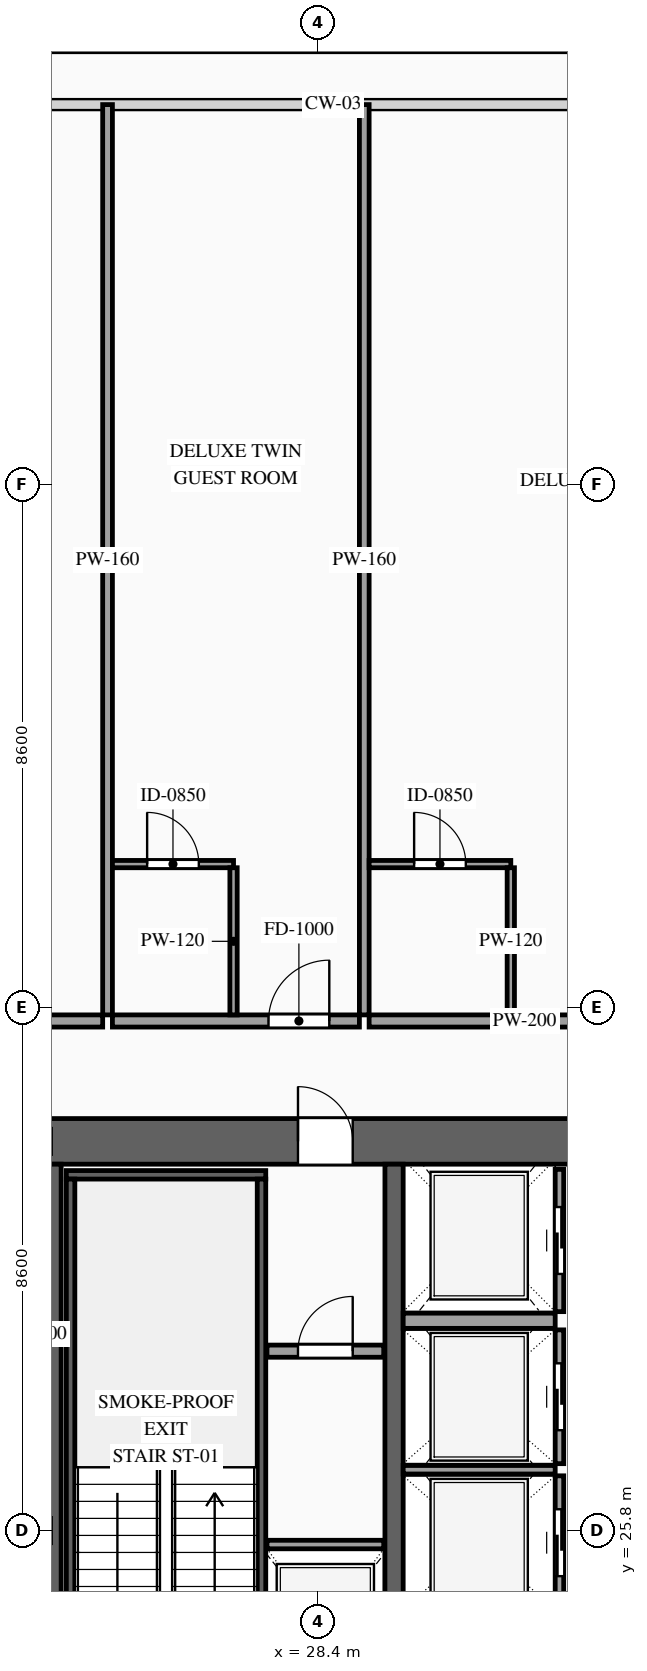
"""IFC4 building model, lengths in metres.
Left out: names, types, materials, properties, quantities, classifications, styles, units other than length and angle.
Written with IfcOpenShell. Run it as: python <this file> out.ifc"""

import sys

from ifc_helpers import new_model, si_unit, direction, frame, frame_2d, origin, place, context, subcontext, project, spatial, rectangle, extrude, source, transform, mapped, element, fill, save


model = new_model("IFC4")
c1 = context("Model", 3, precision=1e-05, world=origin(), true_north=direction((0.0, 1.0)))
c2 = subcontext(c1, "Body", "Model", "MODEL_VIEW")
j1 = project(units=[si_unit("LENGTHUNIT", "METRE"), si_unit("PLANEANGLEUNIT", "RADIAN")], contexts=[c1])
p1 = place(None, origin())
s1 = spatial("IfcSite", under=j1, at=p1, CompositionType="ELEMENT")
p2 = place(p1, origin())
s2 = spatial("IfcBuilding", under=s1, at=p2, CompositionType="ELEMENT")
p3 = place(p2, frame((0.0, 0.0, 145.2)))
s3 = spatial("IfcBuildingStorey", under=s2, at=p3, CompositionType="ELEMENT", Elevation=145.2)
p4 = place(p3, frame((23.425, 32.2, 0.0), z_axis=(0.0, 0.0, 1.0), x_axis=(1.0, 0.0, 0.0)))
e1 = element("IfcWall", 1, at=p4, inside=s3, PredefinedType="SHEAR", context=c2, shape_type="SweptSolid", body=[
    extrude(rectangle(XDim=27.15, YDim=0.75, at=frame_2d((13.575, 0.0))), origin(), (0.0, 0.0, 1.0), 3.6),
])
p5 = place(p4, frame((4.645, 0.0, 0.0)))
e2 = element("IfcOpeningElement", 2, at=p5, cuts=e1, PredefinedType="OPENING", context=c2, shape_type="SweptSolid", body=[
    extrude(rectangle(XDim=0.9, YDim=2.15, at=frame_2d((0.45, 1.075))), frame((0.0, 0.39, 0.0), z_axis=(0.0, -1.0, 0.0), x_axis=(1.0, 0.0, 0.0)), (0.0, 0.0, 1.0), 0.78),
])
p6 = place(p4, frame((9.925, 0.0, 0.0)))
e3 = element("IfcOpeningElement", 3, at=p6, cuts=e1, PredefinedType="OPENING", context=c2, shape_type="SweptSolid", body=[
    extrude(rectangle(XDim=1.1, YDim=2.2, at=frame_2d((0.55, 1.1))), frame((0.0, 0.39, 0.0), z_axis=(0.0, -1.0, 0.0), x_axis=(1.0, 0.0, 0.0)), (0.0, 0.0, 1.0), 0.78),
])
p7 = place(p4, frame((15.775, 0.0, 0.0)))
e4 = element("IfcOpeningElement", 4, at=p7, cuts=e1, PredefinedType="OPENING", context=c2, shape_type="SweptSolid", body=[
    extrude(rectangle(XDim=1.1, YDim=2.2, at=frame_2d((0.55, 1.1))), frame((0.0, 0.39, 0.0), z_axis=(0.0, -1.0, 0.0), x_axis=(1.0, 0.0, 0.0)), (0.0, 0.0, 1.0), 0.78),
])
p8 = place(p4, frame((19.745, 0.0, 0.0)))
e5 = element("IfcOpeningElement", 5, at=p8, cuts=e1, PredefinedType="OPENING", context=c2, shape_type="SweptSolid", body=[
    extrude(rectangle(XDim=0.9, YDim=2.15, at=frame_2d((0.45, 1.075))), frame((0.0, 0.39, 0.0), z_axis=(0.0, -1.0, 0.0), x_axis=(1.0, 0.0, 0.0)), (0.0, 0.0, 1.0), 0.78),
])
m1 = source(origin(), c2, "Body", "SweptSolid", [
    extrude(rectangle(XDim=12.05, YDim=0.75, at=frame_2d((6.025, 0.0))), origin(), (0.0, 0.0, 1.0), 3.6),
])
p9 = place(p3, frame((23.8, 19.775, 0.0), z_axis=(0.0, 0.0, 1.0), x_axis=(0.0, 1.0, 0.0)))
e6 = element("IfcWall", 6, at=p9, inside=s3, PredefinedType="SHEAR", context=c2, shape_type="MappedRepresentation", body=[
    mapped(m1, transform((0.0, 0.0, 0.0), scale=1.0)),
])
m2 = source(origin(), c2, "Body", "SweptSolid", [
    extrude(rectangle(XDim=12.05, YDim=0.3, at=frame_2d((6.025, 0.0))), origin(), (0.0, 0.0, 1.0), 3.6),
])
p10 = place(p3, frame((29.65, 19.775, 0.0), z_axis=(0.0, 0.0, 1.0), x_axis=(0.0, 1.0, 0.0)))
e7 = element("IfcWall", 7, at=p10, inside=s3, PredefinedType="SOLIDWALL", context=c2, shape_type="MappedRepresentation", body=[
    mapped(m2, transform((0.0, 0.0, 0.0), scale=1.0)),
])
m3 = source(origin(), c2, "Body", "SweptSolid", [
    extrude(rectangle(XDim=1.92, YDim=0.14, at=frame_2d((0.96, 0.0))), origin(), (0.0, 0.0, 1.0), 3.38),
])
p11 = place(p3, frame((27.56, 25.57, 0.0), z_axis=(0.0, 0.0, 1.0), x_axis=(1.0, 0.0, 0.0)))
e8 = element("IfcWall", 8, at=p11, inside=s3, PredefinedType="SOLIDWALL", context=c2, shape_type="MappedRepresentation", body=[
    mapped(m3, transform((0.0, 0.0, 0.0), scale=1.0)),
])
p12 = place(p3, frame((32.37, 24.5, 0.0), z_axis=(0.0, 0.0, 1.0), x_axis=(0.0, 1.0, 0.0)))
e9 = element("IfcWall", 9, at=p12, inside=s3, PredefinedType="SOLIDWALL", context=c2, shape_type="SweptSolid", body=[
    extrude(rectangle(XDim=2.2, YDim=0.14, at=frame_2d((1.1, 0.0))), origin(), (0.0, 0.0, 1.0), 3.38),
])
p13 = place(p12, frame((0.55, 0.0, 0.0)))
e10 = element("IfcOpeningElement", 10, at=p13, cuts=e9, PredefinedType="OPENING", context=c2, shape_type="SweptSolid", body=[
    extrude(rectangle(XDim=1.1, YDim=2.2, at=frame_2d((0.55, 1.1))), frame((0.0, 0.085, 0.0), z_axis=(0.0, -1.0, 0.0), x_axis=(1.0, 0.0, 0.0)), (0.0, 0.0, 1.0), 0.17),
])
m4 = source(origin(), c2, "Body", "SweptSolid", [
    extrude(rectangle(XDim=2.5, YDim=0.14, at=frame_2d((1.25, 0.0))), origin(), (0.0, 0.0, 1.0), 3.38),
])
p14 = place(p3, frame((29.8, 26.8, 0.0), z_axis=(0.0, 0.0, 1.0), x_axis=(1.0, 0.0, 0.0)))
e11 = element("IfcWall", 11, at=p14, inside=s3, PredefinedType="SOLIDWALL", context=c2, shape_type="MappedRepresentation", body=[
    mapped(m4, transform((0.0, 0.0, 0.0), scale=1.0)),
])
p15 = place(p3, frame((32.37, 26.9, 0.0), z_axis=(0.0, 0.0, 1.0), x_axis=(0.0, 1.0, 0.0)))
e12 = element("IfcWall", 12, at=p15, inside=s3, PredefinedType="SOLIDWALL", context=c2, shape_type="SweptSolid", body=[
    extrude(rectangle(XDim=2.2, YDim=0.14, at=frame_2d((1.1, 0.0))), origin(), (0.0, 0.0, 1.0), 3.38),
])
p16 = place(p15, frame((0.55, 0.0, 0.0)))
e13 = element("IfcOpeningElement", 13, at=p16, cuts=e12, PredefinedType="OPENING", context=c2, shape_type="SweptSolid", body=[
    extrude(rectangle(XDim=1.1, YDim=2.2, at=frame_2d((0.55, 1.1))), frame((0.0, 0.085, 0.0), z_axis=(0.0, -1.0, 0.0), x_axis=(1.0, 0.0, 0.0)), (0.0, 0.0, 1.0), 0.17),
])
p17 = place(p3, frame((32.37, 29.4, 0.0), z_axis=(0.0, 0.0, 1.0), x_axis=(0.0, 1.0, 0.0)))
e14 = element("IfcWall", 14, at=p17, inside=s3, PredefinedType="SOLIDWALL", context=c2, shape_type="SweptSolid", body=[
    extrude(rectangle(XDim=2.34, YDim=0.14, at=frame_2d((1.17, 0.0))), origin(), (0.0, 0.0, 1.0), 3.38),
])
p18 = place(p17, frame((0.62, 0.0, 0.0)))
e15 = element("IfcOpeningElement", 15, at=p18, cuts=e14, PredefinedType="OPENING", context=c2, shape_type="SweptSolid", body=[
    extrude(rectangle(XDim=1.1, YDim=2.2, at=frame_2d((0.55, 1.1))), frame((0.0, 0.085, 0.0), z_axis=(0.0, -1.0, 0.0), x_axis=(1.0, 0.0, 0.0)), (0.0, 0.0, 1.0), 0.17),
])
m5 = source(origin(), c2, "Body", "SweptSolid", [
    extrude(rectangle(XDim=2.5, YDim=0.25, at=frame_2d((1.25, 0.0))), origin(), (0.0, 0.0, 1.0), 3.38),
])
p19 = place(p3, frame((29.8, 29.25, 0.0), z_axis=(0.0, 0.0, 1.0), x_axis=(1.0, 0.0, 0.0)))
e16 = element("IfcWall", 16, at=p19, inside=s3, PredefinedType="SOLIDWALL", context=c2, shape_type="MappedRepresentation", body=[
    mapped(m5, transform((0.0, 0.0, 0.0), scale=1.0)),
])
m6 = source(origin(), c2, "Body", "SweptSolid", [
    extrude(rectangle(XDim=3.28, YDim=0.14, at=frame_2d((1.64, 0.0))), origin(), (0.0, 0.0, 1.0), 3.38),
])
p20 = place(p3, frame((24.26, 31.65, 0.0), z_axis=(0.0, 0.0, 1.0), x_axis=(1.0, 0.0, 0.0)))
e17 = element("IfcWall", 17, at=p20, inside=s3, PredefinedType="SOLIDWALL", context=c2, shape_type="MappedRepresentation", body=[
    mapped(m6, transform((0.0, 0.0, 0.0), scale=1.0)),
])
m7 = source(origin(), c2, "Body", "SweptSolid", [
    extrude(rectangle(XDim=8.94, YDim=0.14, at=frame_2d((4.47, 0.0))), origin(), (0.0, 0.0, 1.0), 3.38),
])
for number, where, z_axis, x_axis in (
    (18, (24.33, 22.64, 0.0), (0.0, 0.0, 1.0), (0.0, 1.0, 0.0)),
    (19, (27.47, 22.64, 0.0), (0.0, 0.0, 1.0), (0.0, 1.0, 0.0)),
):
    element("IfcWall", number, at=place(p3, frame(where, z_axis=z_axis, x_axis=x_axis)), inside=s3, PredefinedType="SOLIDWALL", context=c2, shape_type="MappedRepresentation", body=[
        mapped(m7, transform((0.0, 0.0, 0.0), scale=1.0)),
    ])
p21 = place(p3, frame((27.56, 28.75, 0.0), z_axis=(0.0, 0.0, 1.0), x_axis=(1.0, 0.0, 0.0)))
e20 = element("IfcWall", 20, at=p21, inside=s3, PredefinedType="PARTITIONING", context=c2, shape_type="SweptSolid", body=[
    extrude(rectangle(XDim=1.92, YDim=0.2, at=frame_2d((0.96, 0.0))), origin(), (0.0, 0.0, 1.0), 3.38),
])
p22 = place(p21, frame((0.51, 0.0, 0.0)))
e21 = element("IfcOpeningElement", 21, at=p22, cuts=e20, PredefinedType="OPENING", context=c2, shape_type="SweptSolid", body=[
    extrude(rectangle(XDim=0.9, YDim=2.15, at=frame_2d((0.45, 1.075))), frame((0.0, 0.115, 0.0), z_axis=(0.0, -1.0, 0.0), x_axis=(1.0, 0.0, 0.0)), (0.0, 0.0, 1.0), 0.23),
])
p23 = place(p3, frame((16.44, 34.18, 0.0), z_axis=(0.0, 0.0, 1.0), x_axis=(1.0, 0.0, 0.0)))
e22 = element("IfcWall", 22, at=p23, inside=s3, PredefinedType="PARTITIONING", context=c2, shape_type="SweptSolid", body=[
    extrude(rectangle(XDim=8.418, YDim=0.2, at=frame_2d((4.209, 0.0))), origin(), (0.0, 0.0, 1.0), 3.38),
])
p24 = place(p23, frame((4.914, 0.0, 0.0)))
e23 = element("IfcOpeningElement", 23, at=p24, cuts=e22, PredefinedType="OPENING", context=c2, shape_type="SweptSolid", body=[
    extrude(rectangle(XDim=1.0, YDim=2.2, at=frame_2d((0.5, 1.1))), frame((0.0, 0.115, 0.0), z_axis=(0.0, -1.0, 0.0), x_axis=(1.0, 0.0, 0.0)), (0.0, 0.0, 1.0), 0.23),
])
m8 = source(origin(), c2, "Body", "SweptSolid", [
    extrude(rectangle(XDim=14.97, YDim=0.16, at=frame_2d((7.485, 0.0))), origin(), (0.0, 0.0, 1.0), 3.38),
])
p25 = place(p3, frame((24.938, 34.28, 0.0), z_axis=(0.0, 0.0, 1.0), x_axis=(0.0, 1.0, 0.0)))
e24 = element("IfcWall", 24, at=p25, inside=s3, PredefinedType="PARTITIONING", context=c2, shape_type="MappedRepresentation", body=[
    mapped(m8, transform((0.0, 0.0, 0.0), scale=1.0)),
])
p26 = place(p3, frame((25.018, 34.18, 0.0), z_axis=(0.0, 0.0, 1.0), x_axis=(1.0, 0.0, 0.0)))
e25 = element("IfcWall", 25, at=p26, inside=s3, PredefinedType="PARTITIONING", context=c2, shape_type="SweptSolid", body=[
    extrude(rectangle(XDim=4.062, YDim=0.2, at=frame_2d((2.031, 0.0))), origin(), (0.0, 0.0, 1.0), 3.38),
])
p27 = place(p26, frame((2.567, 0.0, 0.0)))
e26 = element("IfcOpeningElement", 26, at=p27, cuts=e25, PredefinedType="OPENING", context=c2, shape_type="SweptSolid", body=[
    extrude(rectangle(XDim=1.0, YDim=2.2, at=frame_2d((0.5, 1.1))), frame((0.0, 0.115, 0.0), z_axis=(0.0, -1.0, 0.0), x_axis=(1.0, 0.0, 0.0)), (0.0, 0.0, 1.0), 0.23),
])
p28 = place(p3, frame((29.16, 34.28, 0.0), z_axis=(0.0, 0.0, 1.0), x_axis=(0.0, 1.0, 0.0)))
e27 = element("IfcWall", 27, at=p28, inside=s3, PredefinedType="PARTITIONING", context=c2, shape_type="MappedRepresentation", body=[
    mapped(m8, transform((0.0, 0.0, 0.0), scale=1.0)),
])
p29 = place(p3, frame((25.018, 36.76, 0.0), z_axis=(0.0, 0.0, 1.0), x_axis=(1.0, 0.0, 0.0)))
e28 = element("IfcWall", 28, at=p29, inside=s3, PredefinedType="PARTITIONING", context=c2, shape_type="SweptSolid", body=[
    extrude(rectangle(XDim=1.992, YDim=0.12, at=frame_2d((0.996, 0.0))), origin(), (0.0, 0.0, 1.0), 3.38),
])
p30 = place(p29, frame((0.571, 0.0, 0.0)))
e29 = element("IfcOpeningElement", 29, at=p30, cuts=e28, PredefinedType="OPENING", context=c2, shape_type="SweptSolid", body=[
    extrude(rectangle(XDim=0.85, YDim=2.1, at=frame_2d((0.425, 1.05))), frame((0.0, 0.075, 0.0), z_axis=(0.0, -1.0, 0.0), x_axis=(1.0, 0.0, 0.0)), (0.0, 0.0, 1.0), 0.15),
])
m9 = source(origin(), c2, "Body", "SweptSolid", [
    extrude(rectangle(XDim=2.42, YDim=0.12, at=frame_2d((1.21, 0.0))), origin(), (0.0, 0.0, 1.0), 3.38),
])
p31 = place(p3, frame((27.01, 34.28, 0.0), z_axis=(0.0, 0.0, 1.0), x_axis=(0.0, 1.0, 0.0)))
e30 = element("IfcWall", 30, at=p31, inside=s3, PredefinedType="PARTITIONING", context=c2, shape_type="MappedRepresentation", body=[
    mapped(m9, transform((0.0, 0.0, 0.0), scale=1.0)),
])
p32 = place(p3, frame((29.24, 34.18, 0.0), z_axis=(0.0, 0.0, 1.0), x_axis=(1.0, 0.0, 0.0)))
e31 = element("IfcWall", 31, at=p32, inside=s3, PredefinedType="PARTITIONING", context=c2, shape_type="SweptSolid", body=[
    extrude(rectangle(XDim=9.325, YDim=0.2, at=frame_2d((4.663, 0.0))), origin(), (0.0, 0.0, 1.0), 3.38),
])
p33 = place(p32, frame((5.368, 0.0, 0.0)))
e32 = element("IfcOpeningElement", 32, at=p33, cuts=e31, PredefinedType="OPENING", context=c2, shape_type="SweptSolid", body=[
    extrude(rectangle(XDim=1.0, YDim=2.2, at=frame_2d((0.5, 1.1))), frame((0.0, 0.115, 0.0), z_axis=(0.0, -1.0, 0.0), x_axis=(1.0, 0.0, 0.0)), (0.0, 0.0, 1.0), 0.23),
])
p34 = place(p3, frame((29.24, 36.76, 0.0), z_axis=(0.0, 0.0, 1.0), x_axis=(1.0, 0.0, 0.0)))
e33 = element("IfcWall", 33, at=p34, inside=s3, PredefinedType="PARTITIONING", context=c2, shape_type="SweptSolid", body=[
    extrude(rectangle(XDim=2.33, YDim=0.12, at=frame_2d((1.165, 0.0))), origin(), (0.0, 0.0, 1.0), 3.38),
])
p35 = place(p34, frame((0.74, 0.0, 0.0)))
e34 = element("IfcOpeningElement", 34, at=p35, cuts=e33, PredefinedType="OPENING", context=c2, shape_type="SweptSolid", body=[
    extrude(rectangle(XDim=0.85, YDim=2.1, at=frame_2d((0.425, 1.05))), frame((0.0, 0.075, 0.0), z_axis=(0.0, -1.0, 0.0), x_axis=(1.0, 0.0, 0.0)), (0.0, 0.0, 1.0), 0.15),
])
p36 = place(p3, frame((31.57, 34.28, 0.0), z_axis=(0.0, 0.0, 1.0), x_axis=(0.0, 1.0, 0.0)))
e35 = element("IfcWall", 35, at=p36, inside=s3, PredefinedType="PARTITIONING", context=c2, shape_type="MappedRepresentation", body=[
    mapped(m9, transform((0.0, 0.0, 0.0), scale=1.0)),
])
m10 = source(origin(), c2, "Body", "SweptSolid", [
    extrude(rectangle(XDim=1.1, YDim=2.2, at=frame_2d((0.55, 1.1))), frame((0.0, 0.025, 0.0), z_axis=(0.0, -1.0, 0.0), x_axis=(1.0, 0.0, 0.0)), (0.0, 0.0, 1.0), 0.05),
])
p37 = place(p13, origin())
e36 = element("IfcDoor", 36, at=p37, inside=s3, OperationType="SLIDING_TO_LEFT", PredefinedType="DOOR", context=c2, shape_type="MappedRepresentation", body=[
    mapped(m10, transform((0.0, 0.0, 0.0), scale=1.0)),
])
fill(e10, e36)
p38 = place(p16, origin())
e37 = element("IfcDoor", 37, at=p38, inside=s3, OperationType="SLIDING_TO_RIGHT", PredefinedType="DOOR", context=c2, shape_type="MappedRepresentation", body=[
    mapped(m10, transform((0.0, 0.0, 0.0), scale=1.0)),
])
fill(e13, e37)
p39 = place(p18, origin())
e38 = element("IfcDoor", 38, at=p39, inside=s3, OperationType="SLIDING_TO_LEFT", PredefinedType="DOOR", context=c2, shape_type="MappedRepresentation", body=[
    mapped(m10, transform((0.0, 0.0, 0.0), scale=1.0)),
])
fill(e15, e38)
m11 = source(origin(), c2, "Body", "SweptSolid", [
    extrude(rectangle(XDim=0.9, YDim=2.15, at=frame_2d((0.45, 1.075))), frame((0.0, 0.025, 0.0), z_axis=(0.0, -1.0, 0.0), x_axis=(1.0, 0.0, 0.0)), (0.0, 0.0, 1.0), 0.05),
])
p40 = place(p5, origin())
e39 = element("IfcDoor", 39, at=p40, inside=s3, OperationType="SINGLE_SWING_LEFT", PredefinedType="DOOR", context=c2, shape_type="MappedRepresentation", body=[
    mapped(m11, transform((0.0, 0.0, 0.0), scale=1.0)),
])
fill(e2, e39)
p41 = place(p22, origin())
e40 = element("IfcDoor", 40, at=p41, inside=s3, OperationType="SINGLE_SWING_RIGHT", PredefinedType="DOOR", context=c2, shape_type="MappedRepresentation", body=[
    mapped(m11, transform((0.0, 0.0, 0.0), scale=1.0)),
])
fill(e21, e40)
m12 = source(origin(), c2, "Body", "SweptSolid", [
    extrude(rectangle(XDim=1.0, YDim=2.2, at=frame_2d((0.5, 1.1))), frame((0.0, 0.025, 0.0), z_axis=(0.0, -1.0, 0.0), x_axis=(1.0, 0.0, 0.0)), (0.0, 0.0, 1.0), 0.05),
])
p42 = place(p27, origin())
e41 = element("IfcDoor", 41, at=p42, inside=s3, OperationType="SINGLE_SWING_RIGHT", PredefinedType="DOOR", context=c2, shape_type="MappedRepresentation", body=[
    mapped(m12, transform((0.0, 0.0, 0.0), scale=1.0)),
])
fill(e26, e41)
m13 = source(origin(), c2, "Body", "SweptSolid", [
    extrude(rectangle(XDim=0.85, YDim=2.1, at=frame_2d((0.425, 1.05))), frame((0.0, 0.025, 0.0), z_axis=(0.0, -1.0, 0.0), x_axis=(1.0, 0.0, 0.0)), (0.0, 0.0, 1.0), 0.05),
])
p43 = place(p30, origin())
e42 = element("IfcDoor", 42, at=p43, inside=s3, OperationType="SINGLE_SWING_LEFT", PredefinedType="DOOR", context=c2, shape_type="MappedRepresentation", body=[
    mapped(m13, transform((0.0, 0.0, 0.0), scale=1.0)),
])
fill(e29, e42)
p44 = place(p35, origin())
e43 = element("IfcDoor", 43, at=p44, inside=s3, OperationType="SINGLE_SWING_LEFT", PredefinedType="DOOR", context=c2, shape_type="MappedRepresentation", body=[
    mapped(m13, transform((0.0, 0.0, 0.0), scale=1.0)),
])
fill(e34, e43)
save(model, sys.argv[1])
